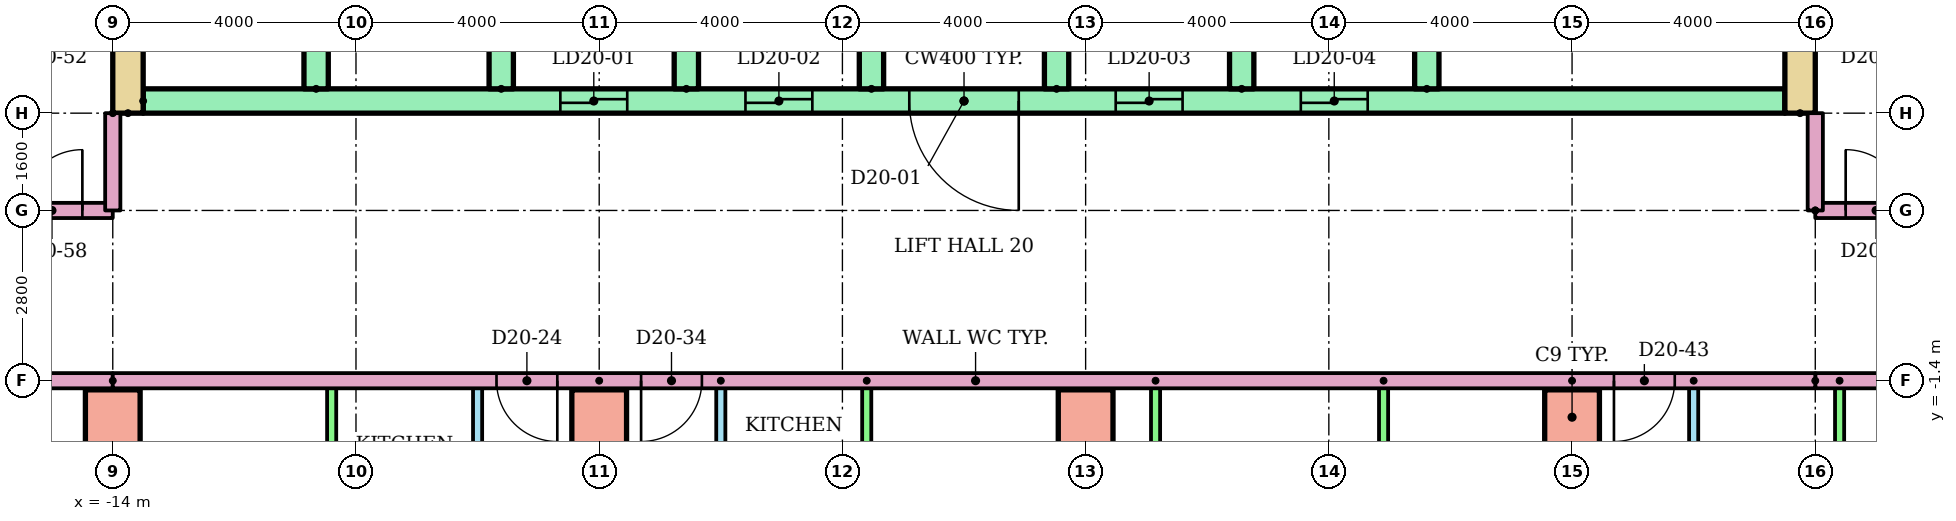
"""IFC4 building model, lengths in metres.
Left out: names, types, materials, properties, quantities, classifications, styles, units other than length and angle.
Written with IfcOpenShell. Run it as: python <this file> out.ifc"""

import sys

from ifc_helpers import new_model, si_unit, direction, frame, frame_2d, origin, origin_2d, place, context, subcontext, project, spatial, rectangle, extrude, element, fill, save


model = new_model("IFC4")
c1 = context("Model", 3, precision=1e-05, world=origin(), true_north=direction((0.0, 1.0)))
c2 = subcontext(c1, "Body", "Model", "MODEL_VIEW")
j1 = project(units=[si_unit("LENGTHUNIT", "METRE"), si_unit("PLANEANGLEUNIT", "RADIAN")], contexts=[c1])
p1 = place(None, origin())
s1 = spatial("IfcSite", under=j1, at=p1, CompositionType="ELEMENT")
p2 = place(p1, origin())
s2 = spatial("IfcBuilding", under=s1, at=p2, CompositionType="ELEMENT")
p3 = place(p2, frame((0.0, 0.0, 80.7)))
s3 = spatial("IfcBuildingStorey", under=s2, at=p3, CompositionType="ELEMENT", Elevation=80.7)
for number, where in (
    (1, (-14.0, -2.0, 0.0)),
    (2, (-6.0, -2.0, 0.0)),
    (3, (2.0, -2.0, 0.0)),
    (4, (10.0, -2.0, 0.0)),
):
    element("IfcColumn", number, at=place(p3, frame(where)), inside=s3, PredefinedType="COLUMN", context=c2, shape_type="SweptSolid", body=[
        extrude(rectangle(XDim=0.9, YDim=0.9, at=origin_2d()), origin(), (0.0, 0.0, 1.0), 3.2),
    ])
for number, where, z_axis, x_axis in (
    (5, (-13.75, 3.0, 0.0), (0.0, 0.0, 1.0), (0.0, 1.0, 0.0)),
    (6, (13.75, 3.0, 0.0), (0.0, 0.0, 1.0), (0.0, 1.0, 0.0)),
):
    element("IfcWall", number, at=place(p3, frame(where, z_axis=z_axis, x_axis=x_axis)), inside=s3, PredefinedType="SHEAR", context=c2, shape_type="SweptSolid", body=[
        extrude(rectangle(XDim=17.0, YDim=0.5, at=frame_2d((8.5, 0.0))), origin(), (0.0, 0.0, 1.0), 2.92),
    ])
p4 = place(p3, frame((-13.5, 3.2, 0.0)))
e7 = element("IfcWall", 7, at=p4, inside=s3, PredefinedType="SHEAR", context=c2, shape_type="SweptSolid", body=[
    extrude(rectangle(XDim=27.0, YDim=0.4, at=frame_2d((13.5, 0.0))), origin(), (0.0, 0.0, 1.0), 2.92),
])
p5 = place(p4, frame((6.861, 0.0, 0.0)))
e8 = element("IfcOpeningElement", 8, at=p5, cuts=e7, PredefinedType="OPENING", context=c2, shape_type="SweptSolid", body=[
    extrude(rectangle(XDim=1.1, YDim=2.1, at=frame_2d((0.55, 1.05))), frame((0.0, 0.21, 0.0), z_axis=(0.0, -1.0, 0.0), x_axis=(1.0, 0.0, 0.0)), (0.0, 0.0, 1.0), 0.42),
])
p6 = place(p4, frame((9.906, 0.0, 0.0)))
e9 = element("IfcOpeningElement", 9, at=p6, cuts=e7, PredefinedType="OPENING", context=c2, shape_type="SweptSolid", body=[
    extrude(rectangle(XDim=1.1, YDim=2.1, at=frame_2d((0.55, 1.05))), frame((0.0, 0.21, 0.0), z_axis=(0.0, -1.0, 0.0), x_axis=(1.0, 0.0, 0.0)), (0.0, 0.0, 1.0), 0.42),
])
p7 = place(p4, frame((15.994, 0.0, 0.0)))
e10 = element("IfcOpeningElement", 10, at=p7, cuts=e7, PredefinedType="OPENING", context=c2, shape_type="SweptSolid", body=[
    extrude(rectangle(XDim=1.1, YDim=2.1, at=frame_2d((0.55, 1.05))), frame((0.0, 0.21, 0.0), z_axis=(0.0, -1.0, 0.0), x_axis=(1.0, 0.0, 0.0)), (0.0, 0.0, 1.0), 0.42),
])
p8 = place(p4, frame((19.039, 0.0, 0.0)))
e11 = element("IfcOpeningElement", 11, at=p8, cuts=e7, PredefinedType="OPENING", context=c2, shape_type="SweptSolid", body=[
    extrude(rectangle(XDim=1.1, YDim=2.1, at=frame_2d((0.55, 1.05))), frame((0.0, 0.21, 0.0), z_axis=(0.0, -1.0, 0.0), x_axis=(1.0, 0.0, 0.0)), (0.0, 0.0, 1.0), 0.42),
])
p9 = place(p4, frame((12.6, 0.0, 0.0)))
e12 = element("IfcOpeningElement", 12, at=p9, cuts=e7, PredefinedType="OPENING", context=c2, shape_type="SweptSolid", body=[
    extrude(rectangle(XDim=1.8, YDim=2.1, at=frame_2d((0.9, 1.05))), frame((0.0, 0.21, 0.0), z_axis=(0.0, -1.0, 0.0), x_axis=(1.0, 0.0, 0.0)), (0.0, 0.0, 1.0), 0.42),
])
for number, where, z_axis, x_axis in (
    (13, (-10.656, 3.4, 0.0), (0.0, 0.0, 1.0), (0.0, 1.0, 0.0)),
    (14, (-7.611, 3.4, 0.0), (0.0, 0.0, 1.0), (0.0, 1.0, 0.0)),
    (15, (-4.567, 3.4, 0.0), (0.0, 0.0, 1.0), (0.0, 1.0, 0.0)),
    (16, (-1.522, 3.4, 0.0), (0.0, 0.0, 1.0), (0.0, 1.0, 0.0)),
    (17, (1.522, 3.4, 0.0), (0.0, 0.0, 1.0), (0.0, 1.0, 0.0)),
    (18, (4.567, 3.4, 0.0), (0.0, 0.0, 1.0), (0.0, 1.0, 0.0)),
    (19, (7.611, 3.4, 0.0), (0.0, 0.0, 1.0), (0.0, 1.0, 0.0)),
):
    element("IfcWall", number, at=place(p3, frame(where, z_axis=z_axis, x_axis=x_axis)), inside=s3, PredefinedType="SHEAR", context=c2, shape_type="SweptSolid", body=[
        extrude(rectangle(XDim=3.0, YDim=0.4, at=frame_2d((1.5, 0.0))), origin(), (0.0, 0.0, 1.0), 2.92),
    ])
p10 = place(p3, frame((-8.0, -7.9, 0.0), z_axis=(0.0, 0.0, 1.0), x_axis=(0.0, 1.0, 0.0)))
e20 = element("IfcWall", 20, at=p10, inside=s3, PredefinedType="PARTITIONING", context=c2, shape_type="SweptSolid", body=[
    extrude(rectangle(XDim=6.5, YDim=0.15, at=frame_2d((3.25, 0.0))), origin(), (0.0, 0.0, 1.0), 2.4),
])
p11 = place(p10, frame((4.3, 0.0, 0.0)))
e21 = element("IfcOpeningElement", 21, at=p11, cuts=e20, PredefinedType="OPENING", context=c2, shape_type="SweptSolid", body=[
    extrude(rectangle(XDim=0.9, YDim=2.1, at=frame_2d((0.45, 1.05))), frame((0.0, 0.085, 0.0), z_axis=(0.0, -1.0, 0.0), x_axis=(1.0, 0.0, 0.0)), (0.0, 0.0, 1.0), 0.17),
])
p12 = place(p10, frame((1.1, 0.0, 0.0)))
e22 = element("IfcOpeningElement", 22, at=p12, cuts=e20, PredefinedType="OPENING", context=c2, shape_type="SweptSolid", body=[
    extrude(rectangle(XDim=0.8, YDim=2.1, at=frame_2d((0.4, 1.05))), frame((0.0, 0.085, 0.0), z_axis=(0.0, -1.0, 0.0), x_axis=(1.0, 0.0, 0.0)), (0.0, 0.0, 1.0), 0.17),
])
p13 = place(p3, frame((-10.4, -7.9, 0.0), z_axis=(0.0, 0.0, 1.0), x_axis=(0.0, 1.0, 0.0)))
e23 = element("IfcWall", 23, at=p13, inside=s3, PredefinedType="PARTITIONING", context=c2, shape_type="SweptSolid", body=[
    extrude(rectangle(XDim=6.5, YDim=0.15, at=frame_2d((3.25, 0.0))), origin(), (0.0, 0.0, 1.0), 2.4),
])
p14 = place(p3, frame((-4.0, -1.4, 0.0), z_axis=(0.0, 0.0, 1.0), x_axis=(0.0, -1.0, 0.0)))
e24 = element("IfcWall", 24, at=p14, inside=s3, PredefinedType="PARTITIONING", context=c2, shape_type="SweptSolid", body=[
    extrude(rectangle(XDim=6.5, YDim=0.15, at=frame_2d((3.25, 0.0))), origin(), (0.0, 0.0, 1.0), 2.4),
])
p15 = place(p14, frame((1.3, 0.0, 0.0)))
e25 = element("IfcOpeningElement", 25, at=p15, cuts=e24, PredefinedType="OPENING", context=c2, shape_type="SweptSolid", body=[
    extrude(rectangle(XDim=0.9, YDim=2.1, at=frame_2d((0.45, 1.05))), frame((0.0, 0.085, 0.0), z_axis=(0.0, -1.0, 0.0), x_axis=(1.0, 0.0, 0.0)), (0.0, 0.0, 1.0), 0.17),
])
p16 = place(p14, frame((4.6, 0.0, 0.0)))
e26 = element("IfcOpeningElement", 26, at=p16, cuts=e24, PredefinedType="OPENING", context=c2, shape_type="SweptSolid", body=[
    extrude(rectangle(XDim=0.8, YDim=2.1, at=frame_2d((0.4, 1.05))), frame((0.0, 0.085, 0.0), z_axis=(0.0, -1.0, 0.0), x_axis=(1.0, 0.0, 0.0)), (0.0, 0.0, 1.0), 0.17),
])
for number, where, z_axis, x_axis in (
    (27, (-1.6, -1.4, 0.0), (0.0, 0.0, 1.0), (0.0, -1.0, 0.0)),
    (28, (3.15, -1.4, 0.0), (0.0, 0.0, 1.0), (0.0, -1.0, 0.0)),
    (29, (6.9, -1.4, 0.0), (0.0, 0.0, 1.0), (0.0, -1.0, 0.0)),
):
    element("IfcWall", number, at=place(p3, frame(where, z_axis=z_axis, x_axis=x_axis)), inside=s3, PredefinedType="PARTITIONING", context=c2, shape_type="SweptSolid", body=[
        extrude(rectangle(XDim=6.5, YDim=0.15, at=frame_2d((3.25, 0.0))), origin(), (0.0, 0.0, 1.0), 2.4),
    ])
p17 = place(p3, frame((-6.0, -1.4, 0.0), z_axis=(0.0, 0.0, 1.0), x_axis=(0.0, -1.0, 0.0)))
e30 = element("IfcWall", 30, at=p17, inside=s3, PredefinedType="PARTITIONING", context=c2, shape_type="SweptSolid", body=[
    extrude(rectangle(XDim=14.81, YDim=0.25, at=frame_2d((7.405, 0.0))), origin(), (0.0, 0.0, 1.0), 2.4),
])
p18 = place(p3, frame((12.0, -1.4, 0.0), z_axis=(0.0, 0.0, 1.0), x_axis=(0.0, -1.0, 0.0)))
e31 = element("IfcWall", 31, at=p18, inside=s3, PredefinedType="PARTITIONING", context=c2, shape_type="SweptSolid", body=[
    extrude(rectangle(XDim=6.5, YDim=0.15, at=frame_2d((3.25, 0.0))), origin(), (0.0, 0.0, 1.0), 2.4),
])
p19 = place(p18, frame((1.3, 0.0, 0.0)))
e32 = element("IfcOpeningElement", 32, at=p19, cuts=e31, PredefinedType="OPENING", context=c2, shape_type="SweptSolid", body=[
    extrude(rectangle(XDim=0.9, YDim=2.1, at=frame_2d((0.45, 1.05))), frame((0.0, 0.085, 0.0), z_axis=(0.0, -1.0, 0.0), x_axis=(1.0, 0.0, 0.0)), (0.0, 0.0, 1.0), 0.17),
])
p20 = place(p18, frame((4.6, 0.0, 0.0)))
e33 = element("IfcOpeningElement", 33, at=p20, cuts=e31, PredefinedType="OPENING", context=c2, shape_type="SweptSolid", body=[
    extrude(rectangle(XDim=0.8, YDim=2.1, at=frame_2d((0.4, 1.05))), frame((0.0, 0.085, 0.0), z_axis=(0.0, -1.0, 0.0), x_axis=(1.0, 0.0, 0.0)), (0.0, 0.0, 1.0), 0.17),
])
p21 = place(p3, frame((14.4, -1.4, 0.0), z_axis=(0.0, 0.0, 1.0), x_axis=(0.0, -1.0, 0.0)))
e34 = element("IfcWall", 34, at=p21, inside=s3, PredefinedType="PARTITIONING", context=c2, shape_type="SweptSolid", body=[
    extrude(rectangle(XDim=6.5, YDim=0.15, at=frame_2d((3.25, 0.0))), origin(), (0.0, 0.0, 1.0), 2.4),
])
p22 = place(p3, frame((10.0, -1.4, 0.0), z_axis=(0.0, 0.0, 1.0), x_axis=(0.0, -1.0, 0.0)))
e35 = element("IfcWall", 35, at=p22, inside=s3, PredefinedType="PARTITIONING", context=c2, shape_type="SweptSolid", body=[
    extrude(rectangle(XDim=14.81, YDim=0.25, at=frame_2d((7.405, 0.0))), origin(), (0.0, 0.0, 1.0), 2.4),
])
p23 = place(p3, frame((-14.0, -1.4, 0.0), z_axis=(0.0, 0.0, 1.0), x_axis=(-1.0, 0.0, 0.0)))
e36 = element("IfcWall", 36, at=p23, inside=s3, PredefinedType="PARTITIONING", context=c2, shape_type="SweptSolid", body=[
    extrude(rectangle(XDim=14.62, YDim=0.25, at=frame_2d((7.31, 0.0))), origin(), (0.0, 0.0, 1.0), 2.4),
])
p24 = place(p3, frame((29.0, -1.4, 0.0), z_axis=(0.0, 0.0, 1.0), x_axis=(-1.0, 0.0, 0.0)))
e37 = element("IfcWall", 37, at=p24, inside=s3, PredefinedType="PARTITIONING", context=c2, shape_type="SweptSolid", body=[
    extrude(rectangle(XDim=15.0, YDim=0.25, at=frame_2d((7.5, 0.0))), origin(), (0.0, 0.0, 1.0), 2.4),
])
p25 = place(p24, frame((1.311, 0.0, 0.0)))
e38 = element("IfcOpeningElement", 38, at=p25, cuts=e37, PredefinedType="OPENING", context=c2, shape_type="SweptSolid", body=[
    extrude(rectangle(XDim=1.0, YDim=2.1, at=frame_2d((0.5, 1.05))), frame((0.0, 0.135, 0.0), z_axis=(0.0, -1.0, 0.0), x_axis=(1.0, 0.0, 0.0)), (0.0, 0.0, 1.0), 0.27),
])
p26 = place(p3, frame((-28.62, 1.4, 0.0)))
e39 = element("IfcWall", 39, at=p26, inside=s3, PredefinedType="PARTITIONING", context=c2, shape_type="SweptSolid", body=[
    extrude(rectangle(XDim=14.62, YDim=0.25, at=frame_2d((7.31, 0.0))), origin(), (0.0, 0.0, 1.0), 2.4),
])
p27 = place(p26, frame((13.12, 0.0, 0.0)))
e40 = element("IfcOpeningElement", 40, at=p27, cuts=e39, PredefinedType="OPENING", context=c2, shape_type="SweptSolid", body=[
    extrude(rectangle(XDim=1.0, YDim=2.1, at=frame_2d((0.5, 1.05))), frame((0.0, 0.135, 0.0), z_axis=(0.0, -1.0, 0.0), x_axis=(1.0, 0.0, 0.0)), (0.0, 0.0, 1.0), 0.27),
])
p28 = place(p3, frame((14.0, 1.4, 0.0)))
e41 = element("IfcWall", 41, at=p28, inside=s3, PredefinedType="PARTITIONING", context=c2, shape_type="SweptSolid", body=[
    extrude(rectangle(XDim=15.0, YDim=0.25, at=frame_2d((7.5, 0.0))), origin(), (0.0, 0.0, 1.0), 2.4),
])
p29 = place(p28, frame((0.5, 0.0, 0.0)))
e42 = element("IfcOpeningElement", 42, at=p29, cuts=e41, PredefinedType="OPENING", context=c2, shape_type="SweptSolid", body=[
    extrude(rectangle(XDim=1.0, YDim=2.1, at=frame_2d((0.5, 1.05))), frame((0.0, 0.135, 0.0), z_axis=(0.0, -1.0, 0.0), x_axis=(1.0, 0.0, 0.0)), (0.0, 0.0, 1.0), 0.27),
])
p30 = place(p28, frame((12.689, 0.0, 0.0)))
e43 = element("IfcOpeningElement", 43, at=p30, cuts=e41, PredefinedType="OPENING", context=c2, shape_type="SweptSolid", body=[
    extrude(rectangle(XDim=1.0, YDim=2.1, at=frame_2d((0.5, 1.05))), frame((0.0, 0.135, 0.0), z_axis=(0.0, -1.0, 0.0), x_axis=(1.0, 0.0, 0.0)), (0.0, 0.0, 1.0), 0.27),
])
p31 = place(p3, frame((14.0, -1.4, 0.0), z_axis=(0.0, 0.0, 1.0), x_axis=(-1.0, 0.0, 0.0)))
e44 = element("IfcWall", 44, at=p31, inside=s3, PredefinedType="PARTITIONING", context=c2, shape_type="SweptSolid", body=[
    extrude(rectangle(XDim=28.0, YDim=0.25, at=frame_2d((14.0, 0.0))), origin(), (0.0, 0.0, 1.0), 2.4),
])
p32 = place(p31, frame((20.689, 0.0, 0.0)))
e45 = element("IfcOpeningElement", 45, at=p32, cuts=e44, PredefinedType="OPENING", context=c2, shape_type="SweptSolid", body=[
    extrude(rectangle(XDim=1.0, YDim=2.1, at=frame_2d((0.5, 1.05))), frame((0.0, 0.135, 0.0), z_axis=(0.0, -1.0, 0.0), x_axis=(1.0, 0.0, 0.0)), (0.0, 0.0, 1.0), 0.27),
])
p33 = place(p31, frame((18.311, 0.0, 0.0)))
e46 = element("IfcOpeningElement", 46, at=p33, cuts=e44, PredefinedType="OPENING", context=c2, shape_type="SweptSolid", body=[
    extrude(rectangle(XDim=1.0, YDim=2.1, at=frame_2d((0.5, 1.05))), frame((0.0, 0.135, 0.0), z_axis=(0.0, -1.0, 0.0), x_axis=(1.0, 0.0, 0.0)), (0.0, 0.0, 1.0), 0.27),
])
p34 = place(p31, frame((2.311, 0.0, 0.0)))
e47 = element("IfcOpeningElement", 47, at=p34, cuts=e44, PredefinedType="OPENING", context=c2, shape_type="SweptSolid", body=[
    extrude(rectangle(XDim=1.0, YDim=2.1, at=frame_2d((0.5, 1.05))), frame((0.0, 0.135, 0.0), z_axis=(0.0, -1.0, 0.0), x_axis=(1.0, 0.0, 0.0)), (0.0, 0.0, 1.0), 0.27),
])
for number, where, z_axis, x_axis in (
    (48, (-14.0, 3.0, 0.0), (0.0, 0.0, 1.0), (0.0, -1.0, 0.0)),
    (49, (14.0, 1.4, 0.0), (0.0, 0.0, 1.0), (0.0, 1.0, 0.0)),
):
    element("IfcWall", number, at=place(p3, frame(where, z_axis=z_axis, x_axis=x_axis)), inside=s3, PredefinedType="PARTITIONING", context=c2, shape_type="SweptSolid", body=[
        extrude(rectangle(XDim=1.6, YDim=0.25, at=frame_2d((0.8, 0.0))), origin(), (0.0, 0.0, 1.0), 2.4),
    ])
p35 = place(p5, origin())
e50 = element("IfcDoor", 50, at=p35, inside=s3, OperationType="SLIDING_TO_LEFT", PredefinedType="DOOR", context=c2, shape_type="SweptSolid", body=[
    extrude(rectangle(XDim=1.1, YDim=2.1, at=frame_2d((0.55, 1.05))), frame((0.0, 0.025, 0.0), z_axis=(0.0, -1.0, 0.0), x_axis=(1.0, 0.0, 0.0)), (0.0, 0.0, 1.0), 0.05),
])
fill(e8, e50)
p36 = place(p6, origin())
e51 = element("IfcDoor", 51, at=p36, inside=s3, OperationType="SLIDING_TO_LEFT", PredefinedType="DOOR", context=c2, shape_type="SweptSolid", body=[
    extrude(rectangle(XDim=1.1, YDim=2.1, at=frame_2d((0.55, 1.05))), frame((0.0, 0.025, 0.0), z_axis=(0.0, -1.0, 0.0), x_axis=(1.0, 0.0, 0.0)), (0.0, 0.0, 1.0), 0.05),
])
fill(e9, e51)
p37 = place(p7, origin())
e52 = element("IfcDoor", 52, at=p37, inside=s3, OperationType="SLIDING_TO_LEFT", PredefinedType="DOOR", context=c2, shape_type="SweptSolid", body=[
    extrude(rectangle(XDim=1.1, YDim=2.1, at=frame_2d((0.55, 1.05))), frame((0.0, 0.025, 0.0), z_axis=(0.0, -1.0, 0.0), x_axis=(1.0, 0.0, 0.0)), (0.0, 0.0, 1.0), 0.05),
])
fill(e10, e52)
p38 = place(p8, origin())
e53 = element("IfcDoor", 53, at=p38, inside=s3, OperationType="SLIDING_TO_LEFT", PredefinedType="DOOR", context=c2, shape_type="SweptSolid", body=[
    extrude(rectangle(XDim=1.1, YDim=2.1, at=frame_2d((0.55, 1.05))), frame((0.0, 0.025, 0.0), z_axis=(0.0, -1.0, 0.0), x_axis=(1.0, 0.0, 0.0)), (0.0, 0.0, 1.0), 0.05),
])
fill(e11, e53)
p39 = place(p9, frame((1.8, 0.0, 0.0), z_axis=(0.0, 0.0, 1.0), x_axis=(-1.0, 0.0, 0.0)))
e54 = element("IfcDoor", 54, at=p39, inside=s3, OperationType="DOUBLE_DOOR_SINGLE_SWING", PredefinedType="DOOR", context=c2, shape_type="SweptSolid", body=[
    extrude(rectangle(XDim=1.8, YDim=2.1, at=frame_2d((0.9, 1.05))), frame((0.0, 0.025, 0.0), z_axis=(0.0, -1.0, 0.0), x_axis=(1.0, 0.0, 0.0)), (0.0, 0.0, 1.0), 0.05),
])
fill(e12, e54)
p40 = place(p32, origin())
e55 = element("IfcDoor", 55, at=p40, inside=s3, OperationType="SINGLE_SWING_LEFT", PredefinedType="DOOR", context=c2, shape_type="SweptSolid", body=[
    extrude(rectangle(XDim=1.0, YDim=2.1, at=frame_2d((0.5, 1.05))), frame((0.0, 0.025, 0.0), z_axis=(0.0, -1.0, 0.0), x_axis=(1.0, 0.0, 0.0)), (0.0, 0.0, 1.0), 0.05),
])
fill(e45, e55)
p41 = place(p33, origin())
e56 = element("IfcDoor", 56, at=p41, inside=s3, OperationType="SINGLE_SWING_RIGHT", PredefinedType="DOOR", context=c2, shape_type="SweptSolid", body=[
    extrude(rectangle(XDim=1.0, YDim=2.1, at=frame_2d((0.5, 1.05))), frame((0.0, 0.025, 0.0), z_axis=(0.0, -1.0, 0.0), x_axis=(1.0, 0.0, 0.0)), (0.0, 0.0, 1.0), 0.05),
])
fill(e46, e56)
p42 = place(p34, origin())
e57 = element("IfcDoor", 57, at=p42, inside=s3, OperationType="SINGLE_SWING_RIGHT", PredefinedType="DOOR", context=c2, shape_type="SweptSolid", body=[
    extrude(rectangle(XDim=1.0, YDim=2.1, at=frame_2d((0.5, 1.05))), frame((0.0, 0.025, 0.0), z_axis=(0.0, -1.0, 0.0), x_axis=(1.0, 0.0, 0.0)), (0.0, 0.0, 1.0), 0.05),
])
fill(e47, e57)
p43 = place(p27, origin())
e58 = element("IfcDoor", 58, at=p43, inside=s3, OperationType="SINGLE_SWING_RIGHT", PredefinedType="DOOR", context=c2, shape_type="SweptSolid", body=[
    extrude(rectangle(XDim=1.0, YDim=2.1, at=frame_2d((0.5, 1.05))), frame((0.0, 0.025, 0.0), z_axis=(0.0, -1.0, 0.0), x_axis=(1.0, 0.0, 0.0)), (0.0, 0.0, 1.0), 0.05),
])
fill(e40, e58)
p44 = place(p29, origin())
e59 = element("IfcDoor", 59, at=p44, inside=s3, OperationType="SINGLE_SWING_LEFT", PredefinedType="DOOR", context=c2, shape_type="SweptSolid", body=[
    extrude(rectangle(XDim=1.0, YDim=2.1, at=frame_2d((0.5, 1.05))), frame((0.0, 0.025, 0.0), z_axis=(0.0, -1.0, 0.0), x_axis=(1.0, 0.0, 0.0)), (0.0, 0.0, 1.0), 0.05),
])
fill(e42, e59)
save(model, sys.argv[1])
